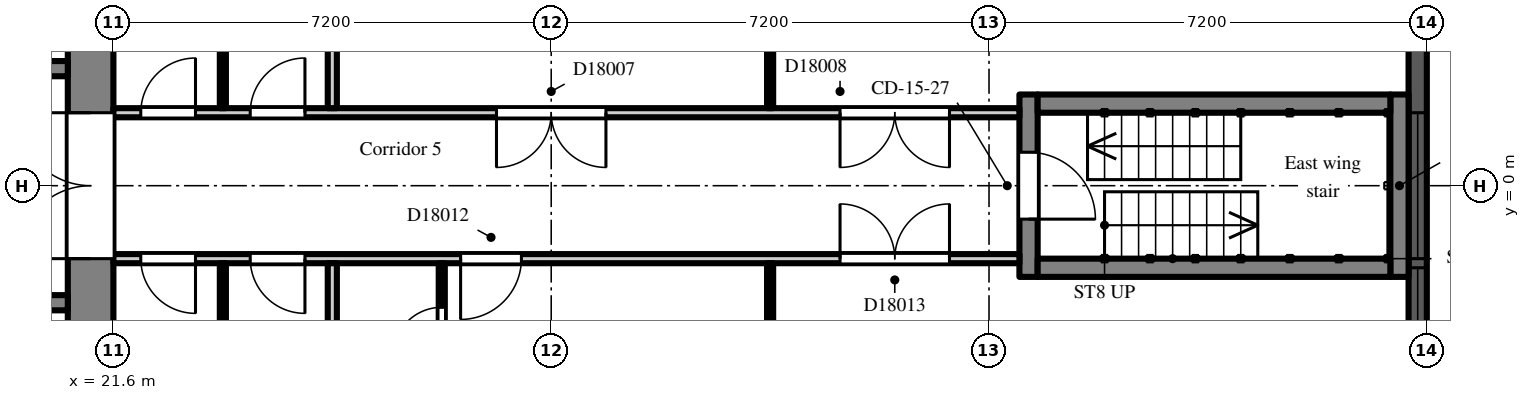
"""IFC4 building model, lengths in metres.
Left out: names, types, materials, properties, quantities, classifications, styles, units other than length and angle.
Written with IfcOpenShell. Run it as: python <this file> out.ifc"""

import sys

from ifc_helpers import new_model, si_unit, direction, frame, frame_2d, origin, place, context, subcontext, project, spatial, rectangle, extrude, element, fill, save


model = new_model("IFC4")
c1 = context("Model", 3, precision=1e-05, world=origin(), true_north=direction((0.0, 1.0)))
c2 = subcontext(c1, "Body", "Model", "MODEL_VIEW")
j1 = project(units=[si_unit("LENGTHUNIT", "METRE"), si_unit("PLANEANGLEUNIT", "RADIAN")], contexts=[c1])
p1 = place(None, origin())
s1 = spatial("IfcSite", under=j1, at=p1, CompositionType="ELEMENT")
p2 = place(p1, origin())
s2 = spatial("IfcBuilding", under=s1, at=p2, CompositionType="ELEMENT")
p3 = place(p2, frame((0.0, 0.0, 120.3)))
s3 = spatial("IfcBuildingStorey", under=s2, at=p3, CompositionType="ELEMENT", Elevation=120.3)
p4 = place(p3, frame((43.05, -2.7, 0.0), z_axis=(0.0, 0.0, 1.0), x_axis=(0.0, 1.0, 0.0)))
e1 = element("IfcWall", 1, at=p4, inside=s3, PredefinedType="SOLIDWALL", context=c2, shape_type="SweptSolid", body=[
    extrude(rectangle(XDim=5.4, YDim=0.3, at=frame_2d((2.7, 0.0))), origin(), (0.0, 0.0, 1.0), 2.2),
])
p5 = place(p4, frame((1.5, 0.0, 0.2)))
e2 = element("IfcOpeningElement", 2, at=p5, cuts=e1, PredefinedType="OPENING", context=c2, shape_type="SweptSolid", body=[
    extrude(rectangle(XDim=2.4, YDim=1.85, at=frame_2d((1.2, 0.925))), frame((0.0, 0.16, 0.0), z_axis=(0.0, -1.0, 0.0), x_axis=(1.0, 0.0, 0.0)), (0.0, 0.0, 1.0), 0.32),
])
p6 = place(p4, frame((0.15, 0.0, 0.2)))
e3 = element("IfcOpeningElement", 3, at=p6, cuts=e1, PredefinedType="OPENING", context=c2, shape_type="SweptSolid", body=[
    extrude(rectangle(XDim=1.2, YDim=1.85, at=frame_2d((0.6, 0.925))), frame((0.0, 0.16, 0.0), z_axis=(0.0, -1.0, 0.0), x_axis=(1.0, 0.0, 0.0)), (0.0, 0.0, 1.0), 0.32),
])
p7 = place(p3, frame((21.225, -7.2, 0.0), z_axis=(0.0, 0.0, 1.0), x_axis=(0.0, 1.0, 0.0)))
e4 = element("IfcWall", 4, at=p7, inside=s3, PredefinedType="SHEAR", context=c2, shape_type="SweptSolid", body=[
    extrude(rectangle(XDim=14.4, YDim=0.75, at=frame_2d((7.2, 0.0))), origin(), (0.0, 0.0, 1.0), 2.6),
])
p8 = place(p7, frame((6.0, 0.0, 0.0)))
e5 = element("IfcOpeningElement", 5, at=p8, cuts=e4, PredefinedType="OPENING", context=c2, shape_type="SweptSolid", body=[
    extrude(rectangle(XDim=2.4, YDim=2.2, at=frame_2d((1.2, 1.1))), frame((0.0, 0.385, 0.0), z_axis=(0.0, -1.0, 0.0), x_axis=(1.0, 0.0, 0.0)), (0.0, 0.0, 1.0), 0.77),
])
p9 = place(p3, frame((7.9, 1.925, 0.0), z_axis=(0.0, 0.0, 1.0), x_axis=(1.0, 0.0, 0.0)))
e6 = element("IfcWall", 6, at=p9, inside=s3, PredefinedType="SHEAR", context=c2, shape_type="SweptSolid", body=[
    extrude(rectangle(XDim=12.95, YDim=0.25, at=frame_2d((6.475, 0.0))), origin(), (0.0, 0.0, 1.0), 2.6),
])
p10 = place(p9, frame((4.825, 0.0, 0.0)))
e7 = element("IfcOpeningElement", 7, at=p10, cuts=e6, PredefinedType="OPENING", context=c2, shape_type="SweptSolid", body=[
    extrude(rectangle(XDim=1.1, YDim=2.1, at=frame_2d((0.55, 1.05))), frame((0.0, 0.135, 0.0), z_axis=(0.0, -1.0, 0.0), x_axis=(1.0, 0.0, 0.0)), (0.0, 0.0, 1.0), 0.27),
])
p11 = place(p9, frame((7.025, 0.0, 0.0)))
e8 = element("IfcOpeningElement", 8, at=p11, cuts=e6, PredefinedType="OPENING", context=c2, shape_type="SweptSolid", body=[
    extrude(rectangle(XDim=1.1, YDim=2.1, at=frame_2d((0.55, 1.05))), frame((0.0, 0.135, 0.0), z_axis=(0.0, -1.0, 0.0), x_axis=(1.0, 0.0, 0.0)), (0.0, 0.0, 1.0), 0.27),
])
p12 = place(p9, frame((9.225, 0.0, 0.0)))
e9 = element("IfcOpeningElement", 9, at=p12, cuts=e6, PredefinedType="OPENING", context=c2, shape_type="SweptSolid", body=[
    extrude(rectangle(XDim=1.1, YDim=2.1, at=frame_2d((0.55, 1.05))), frame((0.0, 0.135, 0.0), z_axis=(0.0, -1.0, 0.0), x_axis=(1.0, 0.0, 0.0)), (0.0, 0.0, 1.0), 0.27),
])
p13 = place(p9, frame((0.525, 0.0, 0.0)))
e10 = element("IfcOpeningElement", 10, at=p13, cuts=e6, PredefinedType="OPENING", context=c2, shape_type="SweptSolid", body=[
    extrude(rectangle(XDim=0.9, YDim=2.1, at=frame_2d((0.45, 1.05))), frame((0.0, 0.135, 0.0), z_axis=(0.0, -1.0, 0.0), x_axis=(1.0, 0.0, 0.0)), (0.0, 0.0, 1.0), 0.27),
])
p14 = place(p9, frame((2.625, 0.0, 0.0)))
e11 = element("IfcOpeningElement", 11, at=p14, cuts=e6, PredefinedType="OPENING", context=c2, shape_type="SweptSolid", body=[
    extrude(rectangle(XDim=1.1, YDim=2.1, at=frame_2d((0.55, 1.05))), frame((0.0, 0.135, 0.0), z_axis=(0.0, -1.0, 0.0), x_axis=(1.0, 0.0, 0.0)), (0.0, 0.0, 1.0), 0.27),
])
p15 = place(p3, frame((7.9, -1.925, 0.0), z_axis=(0.0, 0.0, 1.0), x_axis=(1.0, 0.0, 0.0)))
e12 = element("IfcWall", 12, at=p15, inside=s3, PredefinedType="SHEAR", context=c2, shape_type="SweptSolid", body=[
    extrude(rectangle(XDim=12.95, YDim=0.25, at=frame_2d((6.475, 0.0))), origin(), (0.0, 0.0, 1.0), 2.6),
])
p16 = place(p15, frame((0.525, 0.0, 0.0)))
e13 = element("IfcOpeningElement", 13, at=p16, cuts=e12, PredefinedType="OPENING", context=c2, shape_type="SweptSolid", body=[
    extrude(rectangle(XDim=0.9, YDim=2.1, at=frame_2d((0.45, 1.05))), frame((0.0, 0.135, 0.0), z_axis=(0.0, -1.0, 0.0), x_axis=(1.0, 0.0, 0.0)), (0.0, 0.0, 1.0), 0.27),
])
p17 = place(p15, frame((2.625, 0.0, 0.0)))
e14 = element("IfcOpeningElement", 14, at=p17, cuts=e12, PredefinedType="OPENING", context=c2, shape_type="SweptSolid", body=[
    extrude(rectangle(XDim=1.1, YDim=2.1, at=frame_2d((0.55, 1.05))), frame((0.0, 0.135, 0.0), z_axis=(0.0, -1.0, 0.0), x_axis=(1.0, 0.0, 0.0)), (0.0, 0.0, 1.0), 0.27),
])
p18 = place(p3, frame((36.65, -1.5, 0.0), z_axis=(0.0, 0.0, 1.0), x_axis=(0.0, 1.0, 0.0)))
e15 = element("IfcWall", 15, at=p18, inside=s3, PredefinedType="SHEAR", context=c2, shape_type="SweptSolid", body=[
    extrude(rectangle(XDim=3.0, YDim=0.3, at=frame_2d((1.5, 0.0))), origin(), (0.0, 0.0, 1.0), 2.6),
])
p19 = place(p18, frame((0.95, 0.0, 0.0)))
e16 = element("IfcOpeningElement", 16, at=p19, cuts=e15, PredefinedType="OPENING", context=c2, shape_type="SweptSolid", body=[
    extrude(rectangle(XDim=1.1, YDim=2.1, at=frame_2d((0.55, 1.05))), frame((0.0, 0.16, 0.0), z_axis=(0.0, -1.0, 0.0), x_axis=(1.0, 0.0, 0.0)), (0.0, 0.0, 1.0), 0.32),
])
p20 = place(p3, frame((42.75, -1.5, 0.0), z_axis=(0.0, 0.0, 1.0), x_axis=(0.0, 1.0, 0.0)))
e17 = element("IfcWall", 17, at=p20, inside=s3, PredefinedType="SHEAR", context=c2, shape_type="SweptSolid", body=[
    extrude(rectangle(XDim=3.0, YDim=0.3, at=frame_2d((1.5, 0.0))), origin(), (0.0, 0.0, 1.0), 2.6),
])
for number, where, z_axis, x_axis in (
    (18, (36.8, -1.35, 0.0), (0.0, 0.0, 1.0), (1.0, 0.0, 0.0)),
    (19, (36.8, 1.35, 0.0), (0.0, 0.0, 1.0), (1.0, 0.0, 0.0)),
):
    element("IfcWall", number, at=place(p3, frame(where, z_axis=z_axis, x_axis=x_axis)), inside=s3, PredefinedType="SHEAR", context=c2, shape_type="SweptSolid", body=[
        extrude(rectangle(XDim=5.8, YDim=0.3, at=frame_2d((2.9, 0.0))), origin(), (0.0, 0.0, 1.0), 2.6),
    ])
p21 = place(p3, frame((21.6, -1.2, 0.0), z_axis=(0.0, 0.0, 1.0), x_axis=(1.0, 0.0, 0.0)))
e20 = element("IfcWall", 20, at=p21, inside=s3, PredefinedType="PARTITIONING", context=c2, shape_type="SweptSolid", body=[
    extrude(rectangle(XDim=14.9, YDim=0.15, at=frame_2d((7.45, 0.0))), origin(), (0.0, 0.0, 1.0), 2.6),
])
p22 = place(p21, frame((0.45, 0.0, 0.0)))
e21 = element("IfcOpeningElement", 21, at=p22, cuts=e20, PredefinedType="OPENING", context=c2, shape_type="SweptSolid", body=[
    extrude(rectangle(XDim=0.9, YDim=2.1, at=frame_2d((0.45, 1.05))), frame((0.0, 0.085, 0.0), z_axis=(0.0, -1.0, 0.0), x_axis=(1.0, 0.0, 0.0)), (0.0, 0.0, 1.0), 0.17),
])
p23 = place(p21, frame((2.25, 0.0, 0.0)))
e22 = element("IfcOpeningElement", 22, at=p23, cuts=e20, PredefinedType="OPENING", context=c2, shape_type="SweptSolid", body=[
    extrude(rectangle(XDim=0.9, YDim=2.1, at=frame_2d((0.45, 1.05))), frame((0.0, 0.085, 0.0), z_axis=(0.0, -1.0, 0.0), x_axis=(1.0, 0.0, 0.0)), (0.0, 0.0, 1.0), 0.17),
])
p24 = place(p21, frame((5.71, 0.0, 0.0)))
e23 = element("IfcOpeningElement", 23, at=p24, cuts=e20, PredefinedType="OPENING", context=c2, shape_type="SweptSolid", body=[
    extrude(rectangle(XDim=1.0, YDim=2.1, at=frame_2d((0.5, 1.05))), frame((0.0, 0.085, 0.0), z_axis=(0.0, -1.0, 0.0), x_axis=(1.0, 0.0, 0.0)), (0.0, 0.0, 1.0), 0.17),
])
p25 = place(p21, frame((11.95, 0.0, 0.0)))
e24 = element("IfcOpeningElement", 24, at=p25, cuts=e20, PredefinedType="OPENING", context=c2, shape_type="SweptSolid", body=[
    extrude(rectangle(XDim=1.8, YDim=2.1, at=frame_2d((0.9, 1.05))), frame((0.0, 0.085, 0.0), z_axis=(0.0, -1.0, 0.0), x_axis=(1.0, 0.0, 0.0)), (0.0, 0.0, 1.0), 0.17),
])
p26 = place(p3, frame((21.6, 1.2, 0.0), z_axis=(0.0, 0.0, 1.0), x_axis=(1.0, 0.0, 0.0)))
e25 = element("IfcWall", 25, at=p26, inside=s3, PredefinedType="PARTITIONING", context=c2, shape_type="SweptSolid", body=[
    extrude(rectangle(XDim=14.9, YDim=0.15, at=frame_2d((7.45, 0.0))), origin(), (0.0, 0.0, 1.0), 2.6),
])
p27 = place(p26, frame((0.45, 0.0, 0.0)))
e26 = element("IfcOpeningElement", 26, at=p27, cuts=e25, PredefinedType="OPENING", context=c2, shape_type="SweptSolid", body=[
    extrude(rectangle(XDim=0.9, YDim=2.1, at=frame_2d((0.45, 1.05))), frame((0.0, 0.085, 0.0), z_axis=(0.0, -1.0, 0.0), x_axis=(1.0, 0.0, 0.0)), (0.0, 0.0, 1.0), 0.17),
])
p28 = place(p26, frame((2.25, 0.0, 0.0)))
e27 = element("IfcOpeningElement", 27, at=p28, cuts=e25, PredefinedType="OPENING", context=c2, shape_type="SweptSolid", body=[
    extrude(rectangle(XDim=0.9, YDim=2.1, at=frame_2d((0.45, 1.05))), frame((0.0, 0.085, 0.0), z_axis=(0.0, -1.0, 0.0), x_axis=(1.0, 0.0, 0.0)), (0.0, 0.0, 1.0), 0.17),
])
p29 = place(p26, frame((6.3, 0.0, 0.0)))
e28 = element("IfcOpeningElement", 28, at=p29, cuts=e25, PredefinedType="OPENING", context=c2, shape_type="SweptSolid", body=[
    extrude(rectangle(XDim=1.8, YDim=2.1, at=frame_2d((0.9, 1.05))), frame((0.0, 0.085, 0.0), z_axis=(0.0, -1.0, 0.0), x_axis=(1.0, 0.0, 0.0)), (0.0, 0.0, 1.0), 0.17),
])
p30 = place(p26, frame((11.95, 0.0, 0.0)))
e29 = element("IfcOpeningElement", 29, at=p30, cuts=e25, PredefinedType="OPENING", context=c2, shape_type="SweptSolid", body=[
    extrude(rectangle(XDim=1.8, YDim=2.1, at=frame_2d((0.9, 1.05))), frame((0.0, 0.085, 0.0), z_axis=(0.0, -1.0, 0.0), x_axis=(1.0, 0.0, 0.0)), (0.0, 0.0, 1.0), 0.17),
])
for number, where, z_axis, x_axis in (
    (30, (23.4, -6.9, 0.0), (0.0, 0.0, 1.0), (0.0, 1.0, 0.0)),
    (31, (23.4, 1.275, 0.0), (0.0, 0.0, 1.0), (0.0, 1.0, 0.0)),
):
    element("IfcWall", number, at=place(p3, frame(where, z_axis=z_axis, x_axis=x_axis)), inside=s3, PredefinedType="PARTITIONING", context=c2, shape_type="SweptSolid", body=[
        extrude(rectangle(XDim=5.625, YDim=0.1, at=frame_2d((2.812, 0.0))), origin(), (0.0, 0.0, 1.0), 2.6),
    ])
for number, where, z_axis, x_axis in (
    (32, (25.2, -6.9, 0.0), (0.0, 0.0, 1.0), (0.0, 1.0, 0.0)),
    (33, (25.2, 1.275, 0.0), (0.0, 0.0, 1.0), (0.0, 1.0, 0.0)),
):
    element("IfcWall", number, at=place(p3, frame(where, z_axis=z_axis, x_axis=x_axis)), inside=s3, PredefinedType="PARTITIONING", context=c2, shape_type="SweptSolid", body=[
        extrude(rectangle(XDim=5.625, YDim=0.15, at=frame_2d((2.812, 0.0))), origin(), (0.0, 0.0, 1.0), 2.6),
    ])
p31 = place(p3, frame((27.0, -3.55, 0.0), z_axis=(0.0, 0.0, 1.0), x_axis=(0.0, 1.0, 0.0)))
e34 = element("IfcWall", 34, at=p31, inside=s3, PredefinedType="PARTITIONING", context=c2, shape_type="SweptSolid", body=[
    extrude(rectangle(XDim=2.275, YDim=0.1, at=frame_2d((1.138, 0.0))), origin(), (0.0, 0.0, 1.0), 2.6),
])
p32 = place(p31, frame((0.75, 0.0, 0.0)))
e35 = element("IfcOpeningElement", 35, at=p32, cuts=e34, PredefinedType="OPENING", context=c2, shape_type="SweptSolid", body=[
    extrude(rectangle(XDim=0.8, YDim=2.1, at=frame_2d((0.4, 1.05))), frame((0.0, 0.06, 0.0), z_axis=(0.0, -1.0, 0.0), x_axis=(1.0, 0.0, 0.0)), (0.0, 0.0, 1.0), 0.12),
])
for number, where, z_axis, x_axis in (
    (36, (32.4, -6.9, 0.0), (0.0, 0.0, 1.0), (0.0, 1.0, 0.0)),
    (37, (32.4, 1.275, 0.0), (0.0, 0.0, 1.0), (0.0, 1.0, 0.0)),
):
    element("IfcWall", number, at=place(p3, frame(where, z_axis=z_axis, x_axis=x_axis)), inside=s3, PredefinedType="PARTITIONING", context=c2, shape_type="SweptSolid", body=[
        extrude(rectangle(XDim=5.625, YDim=0.1, at=frame_2d((2.812, 0.0))), origin(), (0.0, 0.0, 1.0), 2.6),
    ])
p33 = place(p5, origin())
e38 = element("IfcWindow", 38, at=p33, inside=s3, PartitioningType="SINGLE_PANEL", PredefinedType="WINDOW", context=c2, shape_type="SweptSolid", body=[
    extrude(rectangle(XDim=2.4, YDim=1.85, at=frame_2d((1.2, 0.925))), frame((0.0, 0.03, 0.0), z_axis=(0.0, -1.0, 0.0), x_axis=(1.0, 0.0, 0.0)), (0.0, 0.0, 1.0), 0.06),
])
fill(e2, e38)
p34 = place(p6, origin())
e39 = element("IfcWindow", 39, at=p34, inside=s3, PartitioningType="SINGLE_PANEL", PredefinedType="WINDOW", context=c2, shape_type="SweptSolid", body=[
    extrude(rectangle(XDim=1.2, YDim=1.85, at=frame_2d((0.6, 0.925))), frame((0.0, 0.03, 0.0), z_axis=(0.0, -1.0, 0.0), x_axis=(1.0, 0.0, 0.0)), (0.0, 0.0, 1.0), 0.06),
])
fill(e3, e39)
p35 = place(p8, origin())
e40 = element("IfcDoor", 40, at=p35, inside=s3, OperationType="DOUBLE_DOOR_DOUBLE_SWING", PredefinedType="DOOR", context=c2, shape_type="SweptSolid", body=[
    extrude(rectangle(XDim=2.4, YDim=2.2, at=frame_2d((1.2, 1.1))), frame((0.0, 0.025, 0.0), z_axis=(0.0, -1.0, 0.0), x_axis=(1.0, 0.0, 0.0)), (0.0, 0.0, 1.0), 0.05),
])
fill(e5, e40)
p36 = place(p19, frame((1.1, 0.0, 0.0), z_axis=(0.0, 0.0, 1.0), x_axis=(-1.0, 0.0, 0.0)))
e41 = element("IfcDoor", 41, at=p36, inside=s3, OperationType="SINGLE_SWING_RIGHT", PredefinedType="DOOR", context=c2, shape_type="SweptSolid", body=[
    extrude(rectangle(XDim=1.1, YDim=2.1, at=frame_2d((0.55, 1.05))), frame((0.0, 0.025, 0.0), z_axis=(0.0, -1.0, 0.0), x_axis=(1.0, 0.0, 0.0)), (0.0, 0.0, 1.0), 0.05),
])
fill(e16, e41)
p37 = place(p27, origin())
e42 = element("IfcDoor", 42, at=p37, inside=s3, OperationType="SINGLE_SWING_RIGHT", PredefinedType="DOOR", context=c2, shape_type="SweptSolid", body=[
    extrude(rectangle(XDim=0.9, YDim=2.1, at=frame_2d((0.45, 1.05))), frame((0.0, 0.025, 0.0), z_axis=(0.0, -1.0, 0.0), x_axis=(1.0, 0.0, 0.0)), (0.0, 0.0, 1.0), 0.05),
])
fill(e26, e42)
p38 = place(p28, origin())
e43 = element("IfcDoor", 43, at=p38, inside=s3, OperationType="SINGLE_SWING_RIGHT", PredefinedType="DOOR", context=c2, shape_type="SweptSolid", body=[
    extrude(rectangle(XDim=0.9, YDim=2.1, at=frame_2d((0.45, 1.05))), frame((0.0, 0.025, 0.0), z_axis=(0.0, -1.0, 0.0), x_axis=(1.0, 0.0, 0.0)), (0.0, 0.0, 1.0), 0.05),
])
fill(e27, e43)
p39 = place(p29, frame((1.8, 0.0, 0.0), z_axis=(0.0, 0.0, 1.0), x_axis=(-1.0, 0.0, 0.0)))
e44 = element("IfcDoor", 44, at=p39, inside=s3, OperationType="DOUBLE_DOOR_DOUBLE_SWING", PredefinedType="DOOR", context=c2, shape_type="SweptSolid", body=[
    extrude(rectangle(XDim=1.8, YDim=2.1, at=frame_2d((0.9, 1.05))), frame((0.0, 0.025, 0.0), z_axis=(0.0, -1.0, 0.0), x_axis=(1.0, 0.0, 0.0)), (0.0, 0.0, 1.0), 0.05),
])
fill(e28, e44)
p40 = place(p30, frame((1.8, 0.0, 0.0), z_axis=(0.0, 0.0, 1.0), x_axis=(-1.0, 0.0, 0.0)))
e45 = element("IfcDoor", 45, at=p40, inside=s3, OperationType="DOUBLE_DOOR_DOUBLE_SWING", PredefinedType="DOOR", context=c2, shape_type="SweptSolid", body=[
    extrude(rectangle(XDim=1.8, YDim=2.1, at=frame_2d((0.9, 1.05))), frame((0.0, 0.025, 0.0), z_axis=(0.0, -1.0, 0.0), x_axis=(1.0, 0.0, 0.0)), (0.0, 0.0, 1.0), 0.05),
])
fill(e29, e45)
p41 = place(p22, frame((0.9, 0.0, 0.0), z_axis=(0.0, 0.0, 1.0), x_axis=(-1.0, 0.0, 0.0)))
e46 = element("IfcDoor", 46, at=p41, inside=s3, OperationType="SINGLE_SWING_LEFT", PredefinedType="DOOR", context=c2, shape_type="SweptSolid", body=[
    extrude(rectangle(XDim=0.9, YDim=2.1, at=frame_2d((0.45, 1.05))), frame((0.0, 0.025, 0.0), z_axis=(0.0, -1.0, 0.0), x_axis=(1.0, 0.0, 0.0)), (0.0, 0.0, 1.0), 0.05),
])
fill(e21, e46)
p42 = place(p23, frame((0.9, 0.0, 0.0), z_axis=(0.0, 0.0, 1.0), x_axis=(-1.0, 0.0, 0.0)))
e47 = element("IfcDoor", 47, at=p42, inside=s3, OperationType="SINGLE_SWING_LEFT", PredefinedType="DOOR", context=c2, shape_type="SweptSolid", body=[
    extrude(rectangle(XDim=0.9, YDim=2.1, at=frame_2d((0.45, 1.05))), frame((0.0, 0.025, 0.0), z_axis=(0.0, -1.0, 0.0), x_axis=(1.0, 0.0, 0.0)), (0.0, 0.0, 1.0), 0.05),
])
fill(e22, e47)
p43 = place(p32, origin())
e48 = element("IfcDoor", 48, at=p43, inside=s3, OperationType="SINGLE_SWING_LEFT", PredefinedType="DOOR", context=c2, shape_type="SweptSolid", body=[
    extrude(rectangle(XDim=0.8, YDim=2.1, at=frame_2d((0.4, 1.05))), frame((0.0, 0.025, 0.0), z_axis=(0.0, -1.0, 0.0), x_axis=(1.0, 0.0, 0.0)), (0.0, 0.0, 1.0), 0.05),
])
fill(e35, e48)
p44 = place(p24, frame((1.0, 0.0, 0.0), z_axis=(0.0, 0.0, 1.0), x_axis=(-1.0, 0.0, 0.0)))
e49 = element("IfcDoor", 49, at=p44, inside=s3, OperationType="SINGLE_SWING_RIGHT", PredefinedType="DOOR", context=c2, shape_type="SweptSolid", body=[
    extrude(rectangle(XDim=1.0, YDim=2.1, at=frame_2d((0.5, 1.05))), frame((0.0, 0.025, 0.0), z_axis=(0.0, -1.0, 0.0), x_axis=(1.0, 0.0, 0.0)), (0.0, 0.0, 1.0), 0.05),
])
fill(e23, e49)
p45 = place(p25, origin())
e50 = element("IfcDoor", 50, at=p45, inside=s3, OperationType="DOUBLE_DOOR_DOUBLE_SWING", PredefinedType="DOOR", context=c2, shape_type="SweptSolid", body=[
    extrude(rectangle(XDim=1.8, YDim=2.1, at=frame_2d((0.9, 1.05))), frame((0.0, 0.025, 0.0), z_axis=(0.0, -1.0, 0.0), x_axis=(1.0, 0.0, 0.0)), (0.0, 0.0, 1.0), 0.05),
])
fill(e24, e50)
save(model, sys.argv[1])
